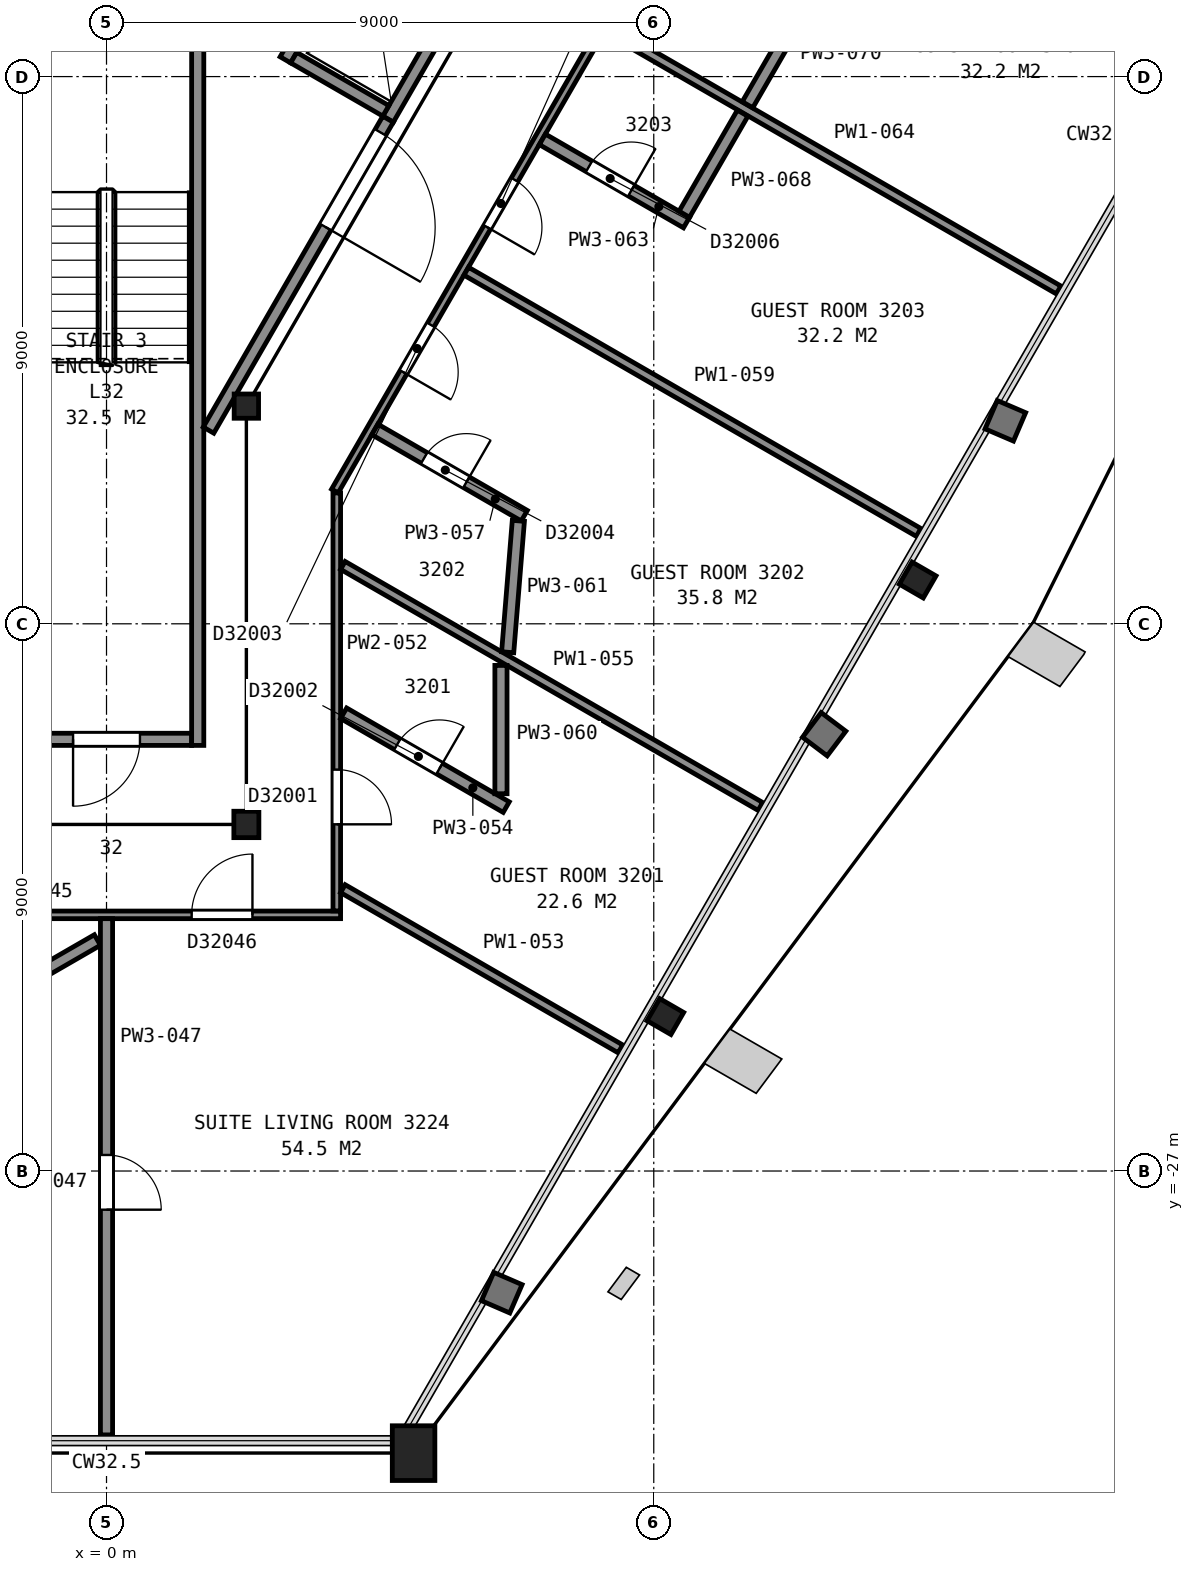
"""IFC4 building model, lengths in metres.
Left out: names, types, materials, properties, quantities, classifications, styles, units other than length and angle.
Written with IfcOpenShell. Run it as: python <this file> out.ifc"""

import sys

from ifc_helpers import new_model, si_unit, direction, frame, frame_2d, origin, origin_2d, place, context, subcontext, project, spatial, rectangle, hollow_rectangle, i_section, extrude, element, fill, save


model = new_model("IFC4")
c1 = context("Model", 3, precision=1e-05, world=origin(), true_north=direction((0.0, 1.0)))
c2 = subcontext(c1, "Body", "Model", "MODEL_VIEW")
j1 = project(units=[si_unit("LENGTHUNIT", "METRE"), si_unit("PLANEANGLEUNIT", "RADIAN")], contexts=[c1])
p1 = place(None, origin())
s1 = spatial("IfcSite", under=j1, at=p1, CompositionType="ELEMENT")
p2 = place(p1, origin())
s2 = spatial("IfcBuilding", under=s1, at=p2, CompositionType="ELEMENT")
p3 = place(p2, frame((0.0, 0.0, 132.4)))
s3 = spatial("IfcBuildingStorey", under=s2, at=p3, CompositionType="ELEMENT", Elevation=132.4)
p4 = place(p3, frame((5.05, -31.64, 0.075), z_axis=(0.0, 0.0, 1.0), x_axis=(-1.0, 0.0, 0.0)))
e1 = element("IfcColumn", 1, at=p4, inside=s3, PredefinedType="COLUMN", context=c2, shape_type="SweptSolid", body=[
    extrude(hollow_rectangle(XDim=0.7, YDim=0.9, WallThickness=0.065, at=origin_2d()), origin(), (0.0, 0.0, 1.0), 3.525),
])
for number, where, z_axis, x_axis in (
    (2, (9.19, -24.46, 0.04), (0.0, 0.0, 1.0), (-0.5, -0.866, 0.0)),
    (3, (13.34, -17.28, 0.04), (0.0, 0.0, 1.0), (-0.5, -0.866, 0.0)),
):
    element("IfcColumn", number, at=place(p3, frame(where, z_axis=z_axis, x_axis=x_axis)), inside=s3, PredefinedType="COLUMN", context=c2, shape_type="SweptSolid", body=[
        extrude(i_section(OverallWidth=0.419, OverallDepth=0.455, WebThickness=0.042, FlangeThickness=0.068, FilletRadius=0.015, at=origin_2d()), origin(), (0.0, 0.0, 1.0), 3.56),
    ])
p5 = place(p3, frame((2.3, -21.3, 0.0), z_axis=(0.0, 0.0, 1.0), x_axis=(-1.0, 0.0, 0.0)))
e4 = element("IfcColumn", 4, at=p5, inside=s3, PredefinedType="COLUMN", context=c2, shape_type="SweptSolid", body=[
    extrude(i_section(OverallWidth=0.411, OverallDepth=0.434, WebThickness=0.036, FlangeThickness=0.057, FilletRadius=0.015, at=origin_2d()), origin(), (0.0, 0.0, 1.0), 3.6),
])
p6 = place(p3, frame((2.3, -14.42, 0.0), z_axis=(0.0, 0.0, 1.0), x_axis=(1.0, 0.0, 0.0)))
e5 = element("IfcColumn", 5, at=p6, inside=s3, PredefinedType="COLUMN", context=c2, shape_type="SweptSolid", body=[
    extrude(i_section(OverallWidth=0.401, OverallDepth=0.399, WebThickness=0.025, FlangeThickness=0.04, FilletRadius=0.015, at=origin_2d()), origin(), (0.0, 0.0, 1.0), 3.6),
])
p7 = place(p3, frame((-1.4, -19.9, 0.0), z_axis=(0.0, 0.0, 1.0), x_axis=(1.0, 0.0, 0.0)))
e6 = element("IfcWall", 6, at=p7, inside=s3, PredefinedType="PARTITIONING", context=c2, shape_type="SweptSolid", body=[
    extrude(rectangle(XDim=2.8, YDim=0.2, at=frame_2d((1.4, 0.0))), origin(), (0.0, 0.0, 1.0), 3.35),
])
p8 = place(p7, frame((0.85, 0.0, 0.0)))
e7 = element("IfcOpeningElement", 7, at=p8, cuts=e6, PredefinedType="OPENING", context=c2, shape_type="SweptSolid", body=[
    extrude(rectangle(XDim=1.1, YDim=2.1, at=frame_2d((0.55, 1.05))), frame((0.0, 0.11, 0.0), z_axis=(0.0, -1.0, 0.0), x_axis=(1.0, 0.0, 0.0)), (0.0, 0.0, 1.0), 0.22),
])
p9 = place(p3, frame((1.5, -8.0, 0.0), z_axis=(0.0, 0.0, 1.0), x_axis=(0.0, -1.0, 0.0)))
e8 = element("IfcWall", 8, at=p9, inside=s3, PredefinedType="PARTITIONING", context=c2, shape_type="SweptSolid", body=[
    extrude(rectangle(XDim=12.0, YDim=0.2, at=frame_2d((6.0, 0.0))), origin(), (0.0, 0.0, 1.0), 3.35),
])
p10 = place(p3, frame((4.63, -9.7, 0.0), z_axis=(0.0, 0.0, 1.0), x_axis=(0.500062241894, 0.865989465428, 0.0)))
e9 = element("IfcWall", 9, at=p10, inside=s3, PredefinedType="PARTITIONING", context=c2, shape_type="SweptSolid", body=[
    extrude(rectangle(XDim=2.55, YDim=0.2, at=frame_2d((1.275, 0.0))), origin(), (0.0, 0.0, 1.0), 3.6),
])
p11 = place(p3, frame((2.942, -8.725, 0.0), z_axis=(0.0, 0.0, 1.0), x_axis=(0.500020783669, 0.866013403995, 0.0)))
e10 = element("IfcWall", 10, at=p11, inside=s3, PredefinedType="PARTITIONING", context=c2, shape_type="SweptSolid", body=[
    extrude(rectangle(XDim=2.55, YDim=0.2, at=frame_2d((1.275, 0.0))), origin(), (0.0, 0.0, 1.0), 3.6),
])
p12 = place(p11, frame((0.725, 0.0, 0.0)))
e11 = element("IfcOpeningElement", 11, at=p12, cuts=e10, PredefinedType="OPENING", context=c2, shape_type="SweptSolid", body=[
    extrude(rectangle(XDim=1.1, YDim=2.1, at=frame_2d((0.55, 1.05))), frame((0.0, 0.11, 0.0), z_axis=(0.0, -1.0, 0.0), x_axis=(1.0, 0.0, 0.0)), (0.0, 0.0, 1.0), 0.22),
])
p13 = place(p3, frame((4.594, -9.563, 0.0), z_axis=(0.0, 0.0, 1.0), x_axis=(-0.866036909293, 0.499980071345, 0.0)))
e12 = element("IfcWall", 12, at=p13, inside=s3, PredefinedType="PARTITIONING", context=c2, shape_type="SweptSolid", body=[
    extrude(rectangle(XDim=1.75, YDim=0.2, at=frame_2d((0.875, 0.0))), origin(), (0.0, 0.0, 1.0), 3.6),
])
p14 = place(p3, frame((1.677, -14.815, 0.0), z_axis=(0.0, 0.0, 1.0), x_axis=(0.49999445743, 0.866028603765, 0.0)))
e13 = element("IfcWall", 13, at=p14, inside=s3, PredefinedType="PARTITIONING", context=c2, shape_type="SweptSolid", body=[
    extrude(rectangle(XDim=5.905, YDim=0.2, at=frame_2d((2.952, 0.0))), origin(), (0.0, 0.0, 1.0), 3.35),
])
p15 = place(p14, frame((3.855, 0.0, 0.0)))
e14 = element("IfcOpeningElement", 14, at=p15, cuts=e13, PredefinedType="OPENING", context=c2, shape_type="SweptSolid", body=[
    extrude(rectangle(XDim=1.8, YDim=2.1, at=frame_2d((0.9, 1.05))), frame((0.0, 0.11, 0.0), z_axis=(0.0, -1.0, 0.0), x_axis=(1.0, 0.0, 0.0)), (0.0, 0.0, 1.0), 0.22),
])
p16 = place(p3, frame((-4.31, -25.602, 0.0), z_axis=(0.0, 0.0, 1.0), x_axis=(0.866045077667, 0.499965922287, 0.0)))
e15 = element("IfcWall", 15, at=p16, inside=s3, PredefinedType="PARTITIONING", context=c2, shape_type="SweptSolid", body=[
    extrude(rectangle(XDim=4.803, YDim=0.2, at=frame_2d((2.401, 0.0))), origin(), (0.0, 0.0, 1.0), 2.613),
])
p17 = place(p3, frame((3.85, -22.787, 0.0), z_axis=(0.0, 0.0, 1.0), x_axis=(-1.0, 0.0, 0.0)))
e16 = element("IfcWall", 16, at=p17, inside=s3, PredefinedType="PARTITIONING", context=c2, shape_type="SweptSolid", body=[
    extrude(rectangle(XDim=7.699, YDim=0.125, at=frame_2d((3.85, 0.0))), origin(), (0.0, 0.0, 1.0), 2.613),
])
p18 = place(p17, frame((1.449, 0.0, 0.0)))
e17 = element("IfcOpeningElement", 17, at=p18, cuts=e16, PredefinedType="OPENING", context=c2, shape_type="SweptSolid", body=[
    extrude(rectangle(XDim=1.0, YDim=2.1, at=frame_2d((0.5, 1.05))), frame((0.0, 0.073, 0.0), z_axis=(0.0, -1.0, 0.0), x_axis=(1.0, 0.0, 0.0)), (0.0, 0.0, 1.0), 0.145),
])
p19 = place(p3, frame((0.0, -31.34, 0.0), z_axis=(0.0, 0.0, 1.0), x_axis=(0.0, 1.0, 0.0)))
e18 = element("IfcWall", 18, at=p19, inside=s3, PredefinedType="PARTITIONING", context=c2, shape_type="SweptSolid", body=[
    extrude(rectangle(XDim=8.49, YDim=0.2, at=frame_2d((4.245, 0.0))), origin(), (0.0, 0.0, 1.0), 2.613),
])
p20 = place(p19, frame((3.704, 0.0, 0.0)))
e19 = element("IfcOpeningElement", 19, at=p20, cuts=e18, PredefinedType="OPENING", context=c2, shape_type="SweptSolid", body=[
    extrude(rectangle(XDim=0.9, YDim=2.1, at=frame_2d((0.45, 1.05))), frame((0.0, 0.11, 0.0), z_axis=(0.0, -1.0, 0.0), x_axis=(1.0, 0.0, 0.0)), (0.0, 0.0, 1.0), 0.22),
])
p21 = place(p3, frame((3.787, -15.847, 0.0), z_axis=(0.0, 0.0, 1.0), x_axis=(0.0, -1.0, 0.0)))
e20 = element("IfcWall", 20, at=p21, inside=s3, PredefinedType="PARTITIONING", context=c2, shape_type="SweptSolid", body=[
    extrude(rectangle(XDim=6.875, YDim=0.125, at=frame_2d((3.438, 0.0))), origin(), (0.0, 0.0, 1.0), 2.613),
])
p22 = place(p21, frame((4.551, 0.0, 0.0)))
e21 = element("IfcOpeningElement", 21, at=p22, cuts=e20, PredefinedType="OPENING", context=c2, shape_type="SweptSolid", body=[
    extrude(rectangle(XDim=0.9, YDim=2.1, at=frame_2d((0.45, 1.05))), frame((0.0, 0.073, 0.0), z_axis=(0.0, -1.0, 0.0), x_axis=(1.0, 0.0, 0.0)), (0.0, 0.0, 1.0), 0.145),
])
p23 = place(p3, frame((3.887, -22.356, 0.0), z_axis=(0.0, 0.0, 1.0), x_axis=(0.866039804031, -0.499975057213, 0.0)))
e22 = element("IfcWall", 22, at=p23, inside=s3, PredefinedType="PARTITIONING", context=c2, shape_type="SweptSolid", body=[
    extrude(rectangle(XDim=5.271, YDim=0.15, at=frame_2d((2.635, 0.0))), origin(), (0.0, 0.0, 1.0), 2.613),
])
p24 = place(p3, frame((3.899, -19.471, 0.0), z_axis=(0.0, 0.0, 1.0), x_axis=(0.866015731669, -0.500016752221, 0.0)))
e23 = element("IfcWall", 23, at=p24, inside=s3, PredefinedType="PARTITIONING", context=c2, shape_type="SweptSolid", body=[
    extrude(rectangle(XDim=3.088, YDim=0.2, at=frame_2d((1.544, 0.0))), origin(), (0.0, 0.0, 1.0), 2.613),
])
p25 = place(p24, frame((1.02, 0.0, 0.0)))
e24 = element("IfcOpeningElement", 24, at=p25, cuts=e23, PredefinedType="OPENING", context=c2, shape_type="SweptSolid", body=[
    extrude(rectangle(XDim=0.8, YDim=2.1, at=frame_2d((0.4, 1.05))), frame((0.0, 0.11, 0.0), z_axis=(0.0, -1.0, 0.0), x_axis=(1.0, 0.0, 0.0)), (0.0, 0.0, 1.0), 0.22),
])
p26 = place(p3, frame((3.887, -17.04, 0.0), z_axis=(0.0, 0.0, 1.0), x_axis=(0.866046118416, -0.499964119488, 0.0)))
e25 = element("IfcWall", 25, at=p26, inside=s3, PredefinedType="PARTITIONING", context=c2, shape_type="SweptSolid", body=[
    extrude(rectangle(XDim=7.929, YDim=0.15, at=frame_2d((3.964, 0.0))), origin(), (0.0, 0.0, 1.0), 2.613),
])
p27 = place(p3, frame((15.962, 5.326, 0.0), z_axis=(0.0, 0.0, 1.0), x_axis=(-0.499992829944, -0.866029543379, 0.0)))
e26 = element("IfcWall", 26, at=p27, inside=s3, PredefinedType="PARTITIONING", context=c2, shape_type="SweptSolid", body=[
    extrude(rectangle(XDim=24.413, YDim=0.125, at=frame_2d((12.207, 0.0))), origin(), (0.0, 0.0, 1.0), 2.613),
])
p28 = place(p27, frame((21.258, 0.0, 0.0)))
e27 = element("IfcOpeningElement", 27, at=p28, cuts=e26, PredefinedType="OPENING", context=c2, shape_type="SweptSolid", body=[
    extrude(rectangle(XDim=0.9, YDim=2.1, at=frame_2d((0.45, 1.05))), frame((0.0, 0.073, 0.0), z_axis=(0.0, -1.0, 0.0), x_axis=(1.0, 0.0, 0.0)), (0.0, 0.0, 1.0), 0.145),
])
p29 = place(p27, frame((18.502, 0.0, 0.0)))
e28 = element("IfcOpeningElement", 28, at=p29, cuts=e26, PredefinedType="OPENING", context=c2, shape_type="SweptSolid", body=[
    extrude(rectangle(XDim=0.9, YDim=2.1, at=frame_2d((0.45, 1.05))), frame((0.0, 0.073, 0.0), z_axis=(0.0, -1.0, 0.0), x_axis=(1.0, 0.0, 0.0)), (0.0, 0.0, 1.0), 0.145),
])
p30 = place(p27, frame((11.799, 0.0, 0.0)))
e29 = element("IfcOpeningElement", 29, at=p30, cuts=e26, PredefinedType="OPENING", context=c2, shape_type="SweptSolid", body=[
    extrude(rectangle(XDim=0.9, YDim=2.1, at=frame_2d((0.45, 1.05))), frame((0.0, 0.073, 0.0), z_axis=(0.0, -1.0, 0.0), x_axis=(1.0, 0.0, 0.0)), (0.0, 0.0, 1.0), 0.145),
])
p31 = place(p27, frame((9.043, 0.0, 0.0)))
e30 = element("IfcOpeningElement", 30, at=p31, cuts=e26, PredefinedType="OPENING", context=c2, shape_type="SweptSolid", body=[
    extrude(rectangle(XDim=0.9, YDim=2.1, at=frame_2d((0.45, 1.05))), frame((0.0, 0.073, 0.0), z_axis=(0.0, -1.0, 0.0), x_axis=(1.0, 0.0, 0.0)), (0.0, 0.0, 1.0), 0.145),
])
p32 = place(p27, frame((1.99, 0.0, 0.0)))
e31 = element("IfcOpeningElement", 31, at=p32, cuts=e26, PredefinedType="OPENING", context=c2, shape_type="SweptSolid", body=[
    extrude(rectangle(XDim=0.9, YDim=2.1, at=frame_2d((0.45, 1.05))), frame((0.0, 0.073, 0.0), z_axis=(0.0, -1.0, 0.0), x_axis=(1.0, 0.0, 0.0)), (0.0, 0.0, 1.0), 0.145),
])
p33 = place(p3, frame((6.871, -16.222, 0.0), z_axis=(0.0, 0.0, 1.0), x_axis=(-0.866048046904, 0.499960778915, 0.0)))
e32 = element("IfcWall", 32, at=p33, inside=s3, PredefinedType="PARTITIONING", context=c2, shape_type="SweptSolid", body=[
    extrude(rectangle(XDim=2.838, YDim=0.2, at=frame_2d((1.419, 0.0))), origin(), (0.0, 0.0, 1.0), 2.613),
])
p34 = place(p33, frame((1.1, 0.0, 0.0)))
e33 = element("IfcOpeningElement", 33, at=p34, cuts=e32, PredefinedType="OPENING", context=c2, shape_type="SweptSolid", body=[
    extrude(rectangle(XDim=0.8, YDim=2.1, at=frame_2d((0.4, 1.05))), frame((0.0, 0.11, 0.0), z_axis=(0.0, -1.0, 0.0), x_axis=(1.0, 0.0, 0.0)), (0.0, 0.0, 1.0), 0.22),
])
p35 = place(p3, frame((5.916, -12.201, 0.0), z_axis=(0.0, 0.0, 1.0), x_axis=(0.865995804368, -0.50005126419, 0.0)))
e34 = element("IfcWall", 34, at=p35, inside=s3, PredefinedType="PARTITIONING", context=c2, shape_type="SweptSolid", body=[
    extrude(rectangle(XDim=8.591, YDim=0.15, at=frame_2d((4.295, 0.0))), origin(), (0.0, 0.0, 1.0), 2.613),
])
p36 = place(p3, frame((6.487, -20.795, 0.0), z_axis=(0.0, 0.0, 1.0), x_axis=(0.0, 1.0, 0.0)))
e35 = element("IfcWall", 35, at=p36, inside=s3, PredefinedType="PARTITIONING", context=c2, shape_type="SweptSolid", body=[
    extrude(rectangle(XDim=2.111, YDim=0.2, at=frame_2d((1.055, 0.0))), origin(), (0.0, 0.0, 1.0), 2.613),
])
p37 = place(p3, frame((6.598, -18.468, 0.0), z_axis=(0.0, 0.0, 1.0), x_axis=(0.080948878916, 0.996718254575, 0.0)))
e36 = element("IfcWall", 36, at=p37, inside=s3, PredefinedType="PARTITIONING", context=c2, shape_type="SweptSolid", body=[
    extrude(rectangle(XDim=2.168, YDim=0.2, at=frame_2d((1.084, 0.0))), origin(), (0.0, 0.0, 1.0), 2.613),
])
p38 = place(p3, frame((7.168, -10.032, 0.0), z_axis=(0.0, 0.0, 1.0), x_axis=(0.86596722502, -0.50010075504, 0.0)))
e37 = element("IfcWall", 37, at=p38, inside=s3, PredefinedType="PARTITIONING", context=c2, shape_type="SweptSolid", body=[
    extrude(rectangle(XDim=2.737, YDim=0.2, at=frame_2d((1.369, 0.0))), origin(), (0.0, 0.0, 1.0), 2.613),
])
p39 = place(p38, frame((0.887, 0.0, 0.0)))
e38 = element("IfcOpeningElement", 38, at=p39, cuts=e37, PredefinedType="OPENING", context=c2, shape_type="SweptSolid", body=[
    extrude(rectangle(XDim=0.8, YDim=2.1, at=frame_2d((0.4, 1.05))), frame((0.0, 0.11, 0.0), z_axis=(0.0, -1.0, 0.0), x_axis=(1.0, 0.0, 0.0)), (0.0, 0.0, 1.0), 0.22),
])
p40 = place(p3, frame((8.218, -8.213, 0.0), z_axis=(0.0, 0.0, 1.0), x_axis=(0.865997709989, -0.500047963993, 0.0)))
e39 = element("IfcWall", 39, at=p40, inside=s3, PredefinedType="PARTITIONING", context=c2, shape_type="SweptSolid", body=[
    extrude(rectangle(XDim=8.592, YDim=0.15, at=frame_2d((4.296, 0.0))), origin(), (0.0, 0.0, 1.0), 2.613),
])
p41 = place(p3, frame((9.502, -11.264, 0.0), z_axis=(0.0, 0.0, 1.0), x_axis=(0.499887618105, 0.86609027778, 0.0)))
e40 = element("IfcWall", 40, at=p41, inside=s3, PredefinedType="PARTITIONING", context=c2, shape_type="SweptSolid", body=[
    extrude(rectangle(XDim=1.919, YDim=0.2, at=frame_2d((0.96, 0.0))), origin(), (0.0, 0.0, 1.0), 2.613),
])
p42 = place(p3, frame((10.542, -9.463, 0.0), z_axis=(0.0, 0.0, 1.0), x_axis=(0.500214044309, 0.865901789971, 0.0)))
e41 = element("IfcWall", 41, at=p42, inside=s3, PredefinedType="PARTITIONING", context=c2, shape_type="SweptSolid", body=[
    extrude(rectangle(XDim=1.92, YDim=0.2, at=frame_2d((0.96, 0.0))), origin(), (0.0, 0.0, 1.0), 2.613),
])
p43 = place(p8, origin())
e42 = element("IfcDoor", 42, at=p43, inside=s3, OperationType="SINGLE_SWING_LEFT", PredefinedType="DOOR", context=c2, shape_type="SweptSolid", body=[
    extrude(rectangle(XDim=1.1, YDim=2.1, at=frame_2d((0.55, 1.05))), frame((0.0, 0.025, 0.0), z_axis=(0.0, -1.0, 0.0), x_axis=(1.0, 0.0, 0.0)), (0.0, 0.0, 1.0), 0.05),
])
fill(e7, e42)
p44 = place(p15, origin())
e43 = element("IfcDoor", 43, at=p44, inside=s3, OperationType="DOUBLE_DOOR_SINGLE_SWING", PredefinedType="DOOR", context=c2, shape_type="SweptSolid", body=[
    extrude(rectangle(XDim=1.8, YDim=2.1, at=frame_2d((0.9, 1.05))), frame((0.0, 0.025, 0.0), z_axis=(0.0, -1.0, 0.0), x_axis=(1.0, 0.0, 0.0)), (0.0, 0.0, 1.0), 0.05),
])
fill(e14, e43)
p45 = place(p18, origin())
e44 = element("IfcDoor", 44, at=p45, inside=s3, OperationType="SINGLE_SWING_LEFT", PredefinedType="DOOR", context=c2, shape_type="SweptSolid", body=[
    extrude(rectangle(XDim=1.0, YDim=2.1, at=frame_2d((0.5, 1.05))), frame((0.0, 0.025, 0.0), z_axis=(0.0, -1.0, 0.0), x_axis=(1.0, 0.0, 0.0)), (0.0, 0.0, 1.0), 0.05),
])
fill(e17, e44)
p46 = place(p20, origin())
e45 = element("IfcDoor", 45, at=p46, inside=s3, OperationType="SINGLE_SWING_LEFT", PredefinedType="DOOR", context=c2, shape_type="SweptSolid", body=[
    extrude(rectangle(XDim=0.9, YDim=2.1, at=frame_2d((0.45, 1.05))), frame((0.0, 0.025, 0.0), z_axis=(0.0, -1.0, 0.0), x_axis=(1.0, 0.0, 0.0)), (0.0, 0.0, 1.0), 0.05),
])
fill(e19, e45)
p47 = place(p22, origin())
e46 = element("IfcDoor", 46, at=p47, inside=s3, OperationType="SINGLE_SWING_RIGHT", PredefinedType="DOOR", context=c2, shape_type="SweptSolid", body=[
    extrude(rectangle(XDim=0.9, YDim=2.1, at=frame_2d((0.45, 1.05))), frame((0.0, 0.025, 0.0), z_axis=(0.0, -1.0, 0.0), x_axis=(1.0, 0.0, 0.0)), (0.0, 0.0, 1.0), 0.05),
])
fill(e21, e46)
p48 = place(p25, origin())
e47 = element("IfcDoor", 47, at=p48, inside=s3, OperationType="SINGLE_SWING_RIGHT", PredefinedType="DOOR", context=c2, shape_type="SweptSolid", body=[
    extrude(rectangle(XDim=0.8, YDim=2.1, at=frame_2d((0.4, 1.05))), frame((0.0, 0.025, 0.0), z_axis=(0.0, -1.0, 0.0), x_axis=(1.0, 0.0, 0.0)), (0.0, 0.0, 1.0), 0.05),
])
fill(e24, e47)
p49 = place(p28, origin())
e48 = element("IfcDoor", 48, at=p49, inside=s3, OperationType="SINGLE_SWING_RIGHT", PredefinedType="DOOR", context=c2, shape_type="SweptSolid", body=[
    extrude(rectangle(XDim=0.9, YDim=2.1, at=frame_2d((0.45, 1.05))), frame((0.0, 0.025, 0.0), z_axis=(0.0, -1.0, 0.0), x_axis=(1.0, 0.0, 0.0)), (0.0, 0.0, 1.0), 0.05),
])
fill(e27, e48)
p50 = place(p29, origin())
e49 = element("IfcDoor", 49, at=p50, inside=s3, OperationType="SINGLE_SWING_RIGHT", PredefinedType="DOOR", context=c2, shape_type="SweptSolid", body=[
    extrude(rectangle(XDim=0.9, YDim=2.1, at=frame_2d((0.45, 1.05))), frame((0.0, 0.025, 0.0), z_axis=(0.0, -1.0, 0.0), x_axis=(1.0, 0.0, 0.0)), (0.0, 0.0, 1.0), 0.05),
])
fill(e28, e49)
p51 = place(p34, origin())
e50 = element("IfcDoor", 50, at=p51, inside=s3, OperationType="SINGLE_SWING_LEFT", PredefinedType="DOOR", context=c2, shape_type="SweptSolid", body=[
    extrude(rectangle(XDim=0.8, YDim=2.1, at=frame_2d((0.4, 1.05))), frame((0.0, 0.025, 0.0), z_axis=(0.0, -1.0, 0.0), x_axis=(1.0, 0.0, 0.0)), (0.0, 0.0, 1.0), 0.05),
])
fill(e33, e50)
p52 = place(p39, origin())
e51 = element("IfcDoor", 51, at=p52, inside=s3, OperationType="SINGLE_SWING_RIGHT", PredefinedType="DOOR", context=c2, shape_type="SweptSolid", body=[
    extrude(rectangle(XDim=0.8, YDim=2.1, at=frame_2d((0.4, 1.05))), frame((0.0, 0.025, 0.0), z_axis=(0.0, -1.0, 0.0), x_axis=(1.0, 0.0, 0.0)), (0.0, 0.0, 1.0), 0.05),
])
fill(e38, e51)
save(model, sys.argv[1])
